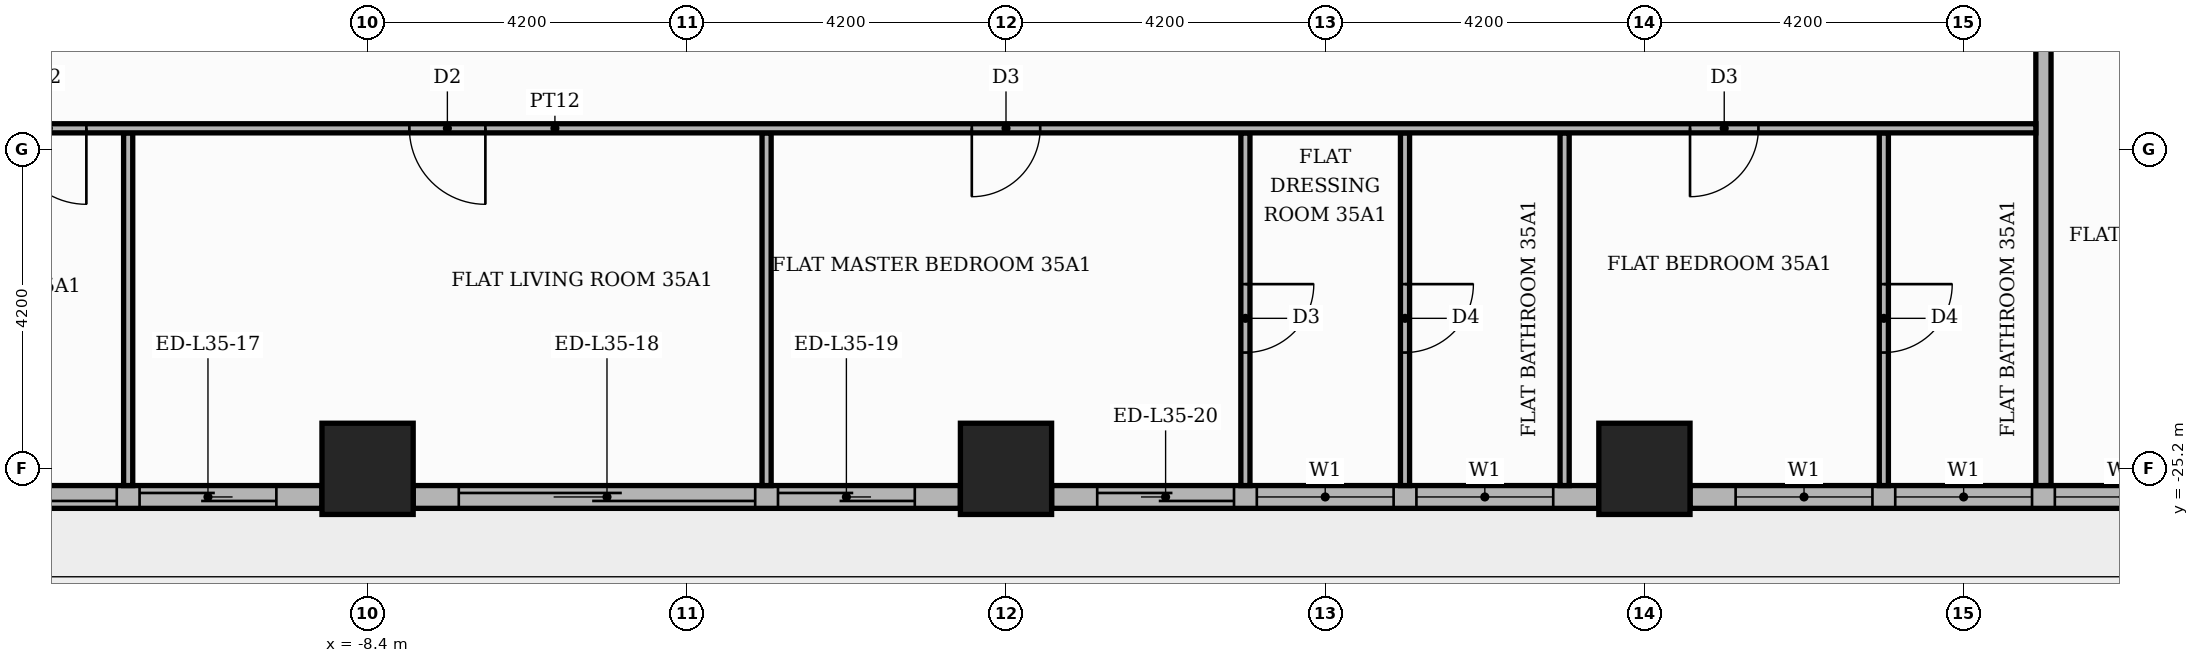
"""IFC4 building model, lengths in metres.
Left out: names, types, materials, properties, quantities, classifications, styles, units other than length and angle.
Written with IfcOpenShell. Run it as: python <this file> out.ifc"""

import sys

from ifc_helpers import new_model, si_unit, direction, frame, frame_2d, origin, origin_2d, place, context, subcontext, project, spatial, rectangle, extrude, element, fill, save


model = new_model("IFC4")
c1 = context("Model", 3, precision=1e-05, world=origin(), true_north=direction((0.0, 1.0)))
c2 = subcontext(c1, "Body", "Model", "MODEL_VIEW")
j1 = project(units=[si_unit("LENGTHUNIT", "METRE"), si_unit("PLANEANGLEUNIT", "RADIAN")], contexts=[c1])
p1 = place(None, origin())
s1 = spatial("IfcSite", under=j1, at=p1, CompositionType="ELEMENT")
p2 = place(p1, origin())
s2 = spatial("IfcBuilding", under=s1, at=p2, CompositionType="ELEMENT")
p3 = place(p2, frame((0.0, 0.0, 149.4)))
s3 = spatial("IfcBuildingStorey", under=s2, at=p3, CompositionType="ELEMENT", Elevation=149.4)
for number, where, z_axis, x_axis in (
    (1, (0.0, -25.2, 0.0), (0.0, 0.0, 1.0), (1.0, 0.0, 0.0)),
    (2, (8.4, -25.2, 0.0), (0.0, 0.0, 1.0), (1.0, 0.0, 0.0)),
    (3, (-8.4, -25.2, 0.0), (0.0, 0.0, 1.0), (1.0, 0.0, 0.0)),
):
    element("IfcColumn", number, at=place(p3, frame(where, z_axis=z_axis, x_axis=x_axis)), inside=s3, PredefinedType="COLUMN", context=c2, shape_type="SweptSolid", body=[
        extrude(rectangle(XDim=1.2, YDim=1.2, at=origin_2d()), origin(), (0.0, 0.0, 1.0), 3.9),
    ])
p4 = place(p3, frame((-16.2, -25.57, 0.0), z_axis=(0.0, 0.0, 1.0), x_axis=(1.0, 0.0, 0.0)))
e4 = element("IfcWall", 4, at=p4, inside=s3, PredefinedType="STANDARD", context=c2, shape_type="SweptSolid", body=[
    extrude(rectangle(XDim=7.2, YDim=0.3, at=frame_2d((3.6, 0.0))), origin(), (0.0, 0.0, 1.0), 3.48),
])
p5 = place(p4, frame((0.6, 0.0, 0.0)))
e5 = element("IfcOpeningElement", 5, at=p5, cuts=e4, PredefinedType="OPENING", context=c2, shape_type="SweptSolid", body=[
    extrude(rectangle(XDim=3.9, YDim=2.4, at=frame_2d((1.95, 1.2))), frame((0.0, 0.16, 0.0), z_axis=(0.0, -1.0, 0.0), x_axis=(1.0, 0.0, 0.0)), (0.0, 0.0, 1.0), 0.32),
])
p6 = place(p4, frame((4.8, 0.0, 0.0)))
e6 = element("IfcOpeningElement", 6, at=p6, cuts=e4, PredefinedType="OPENING", context=c2, shape_type="SweptSolid", body=[
    extrude(rectangle(XDim=1.8, YDim=2.4, at=frame_2d((0.9, 1.2))), frame((0.0, 0.16, 0.0), z_axis=(0.0, -1.0, 0.0), x_axis=(1.0, 0.0, 0.0)), (0.0, 0.0, 1.0), 0.32),
])
p7 = place(p3, frame((-7.8, -25.57, 0.0), z_axis=(0.0, 0.0, 1.0), x_axis=(1.0, 0.0, 0.0)))
e7 = element("IfcWall", 7, at=p7, inside=s3, PredefinedType="STANDARD", context=c2, shape_type="SweptSolid", body=[
    extrude(rectangle(XDim=7.2, YDim=0.3, at=frame_2d((3.6, 0.0))), origin(), (0.0, 0.0, 1.0), 3.48),
])
p8 = place(p7, frame((0.6, 0.0, 0.0)))
e8 = element("IfcOpeningElement", 8, at=p8, cuts=e7, PredefinedType="OPENING", context=c2, shape_type="SweptSolid", body=[
    extrude(rectangle(XDim=3.9, YDim=2.4, at=frame_2d((1.95, 1.2))), frame((0.0, 0.16, 0.0), z_axis=(0.0, -1.0, 0.0), x_axis=(1.0, 0.0, 0.0)), (0.0, 0.0, 1.0), 0.32),
])
p9 = place(p7, frame((4.8, 0.0, 0.0)))
e9 = element("IfcOpeningElement", 9, at=p9, cuts=e7, PredefinedType="OPENING", context=c2, shape_type="SweptSolid", body=[
    extrude(rectangle(XDim=1.8, YDim=2.4, at=frame_2d((0.9, 1.2))), frame((0.0, 0.16, 0.0), z_axis=(0.0, -1.0, 0.0), x_axis=(1.0, 0.0, 0.0)), (0.0, 0.0, 1.0), 0.32),
])
p10 = place(p3, frame((0.6, -25.57, 0.0), z_axis=(0.0, 0.0, 1.0), x_axis=(1.0, 0.0, 0.0)))
e10 = element("IfcWall", 10, at=p10, inside=s3, PredefinedType="STANDARD", context=c2, shape_type="SweptSolid", body=[
    extrude(rectangle(XDim=7.2, YDim=0.3, at=frame_2d((3.6, 0.0))), origin(), (0.0, 0.0, 1.0), 3.48),
])
p11 = place(p10, frame((0.6, 0.0, 0.0)))
e11 = element("IfcOpeningElement", 11, at=p11, cuts=e10, PredefinedType="OPENING", context=c2, shape_type="SweptSolid", body=[
    extrude(rectangle(XDim=1.8, YDim=2.4, at=frame_2d((0.9, 1.2))), frame((0.0, 0.16, 0.0), z_axis=(0.0, -1.0, 0.0), x_axis=(1.0, 0.0, 0.0)), (0.0, 0.0, 1.0), 0.32),
])
p12 = place(p10, frame((2.7, 0.0, 0.9)))
e12 = element("IfcOpeningElement", 12, at=p12, cuts=e10, PredefinedType="OPENING", context=c2, shape_type="SweptSolid", body=[
    extrude(rectangle(XDim=1.8, YDim=2.1, at=frame_2d((0.9, 1.05))), frame((0.0, 0.16, 0.0), z_axis=(0.0, -1.0, 0.0), x_axis=(1.0, 0.0, 0.0)), (0.0, 0.0, 1.0), 0.32),
])
p13 = place(p10, frame((4.8, 0.0, 0.9)))
e13 = element("IfcOpeningElement", 13, at=p13, cuts=e10, PredefinedType="OPENING", context=c2, shape_type="SweptSolid", body=[
    extrude(rectangle(XDim=1.8, YDim=2.1, at=frame_2d((0.9, 1.05))), frame((0.0, 0.16, 0.0), z_axis=(0.0, -1.0, 0.0), x_axis=(1.0, 0.0, 0.0)), (0.0, 0.0, 1.0), 0.32),
])
p14 = place(p3, frame((9.0, -25.57, 0.0), z_axis=(0.0, 0.0, 1.0), x_axis=(1.0, 0.0, 0.0)))
e14 = element("IfcWall", 14, at=p14, inside=s3, PredefinedType="STANDARD", context=c2, shape_type="SweptSolid", body=[
    extrude(rectangle(XDim=7.2, YDim=0.3, at=frame_2d((3.6, 0.0))), origin(), (0.0, 0.0, 1.0), 3.48),
])
p15 = place(p14, frame((0.6, 0.0, 0.9)))
e15 = element("IfcOpeningElement", 15, at=p15, cuts=e14, PredefinedType="OPENING", context=c2, shape_type="SweptSolid", body=[
    extrude(rectangle(XDim=1.8, YDim=2.1, at=frame_2d((0.9, 1.05))), frame((0.0, 0.16, 0.0), z_axis=(0.0, -1.0, 0.0), x_axis=(1.0, 0.0, 0.0)), (0.0, 0.0, 1.0), 0.32),
])
p16 = place(p14, frame((2.7, 0.0, 0.9)))
e16 = element("IfcOpeningElement", 16, at=p16, cuts=e14, PredefinedType="OPENING", context=c2, shape_type="SweptSolid", body=[
    extrude(rectangle(XDim=1.8, YDim=2.1, at=frame_2d((0.9, 1.05))), frame((0.0, 0.16, 0.0), z_axis=(0.0, -1.0, 0.0), x_axis=(1.0, 0.0, 0.0)), (0.0, 0.0, 1.0), 0.32),
])
p17 = place(p14, frame((4.8, 0.0, 0.9)))
e17 = element("IfcOpeningElement", 17, at=p17, cuts=e14, PredefinedType="OPENING", context=c2, shape_type="SweptSolid", body=[
    extrude(rectangle(XDim=1.8, YDim=2.1, at=frame_2d((0.9, 1.05))), frame((0.0, 0.16, 0.0), z_axis=(0.0, -1.0, 0.0), x_axis=(1.0, 0.0, 0.0)), (0.0, 0.0, 1.0), 0.32),
])
for number, where, z_axis, x_axis in (
    (18, (-11.55, -25.42, 0.0), (0.0, 0.0, 1.0), (0.0, 1.0, 0.0)),
    (19, (-3.15, -25.42, 0.0), (0.0, 0.0, 1.0), (0.0, 1.0, 0.0)),
):
    element("IfcWall", number, at=place(p3, frame(where, z_axis=z_axis, x_axis=x_axis)), inside=s3, PredefinedType="PARTITIONING", context=c2, shape_type="SweptSolid", body=[
        extrude(rectangle(XDim=4.64, YDim=0.12, at=frame_2d((2.32, 0.0))), origin(), (0.0, 0.0, 1.0), 3.48),
    ])
p18 = place(p3, frame((3.15, -25.42, 0.0), z_axis=(0.0, 0.0, 1.0), x_axis=(0.0, 1.0, 0.0)))
e20 = element("IfcWall", 20, at=p18, inside=s3, PredefinedType="PARTITIONING", context=c2, shape_type="SweptSolid", body=[
    extrude(rectangle(XDim=4.64, YDim=0.12, at=frame_2d((2.32, 0.0))), origin(), (0.0, 0.0, 1.0), 3.48),
])
p19 = place(p18, frame((1.75, 0.0, 0.0)))
e21 = element("IfcOpeningElement", 21, at=p19, cuts=e20, PredefinedType="OPENING", context=c2, shape_type="SweptSolid", body=[
    extrude(rectangle(XDim=0.9, YDim=2.1, at=frame_2d((0.45, 1.05))), frame((0.0, 0.07, 0.0), z_axis=(0.0, -1.0, 0.0), x_axis=(1.0, 0.0, 0.0)), (0.0, 0.0, 1.0), 0.14),
])
p20 = place(p3, frame((5.25, -25.42, 0.0), z_axis=(0.0, 0.0, 1.0), x_axis=(0.0, 1.0, 0.0)))
e22 = element("IfcWall", 22, at=p20, inside=s3, PredefinedType="PARTITIONING", context=c2, shape_type="SweptSolid", body=[
    extrude(rectangle(XDim=4.64, YDim=0.12, at=frame_2d((2.32, 0.0))), origin(), (0.0, 0.0, 1.0), 3.48),
])
p21 = place(p20, frame((1.75, 0.0, 0.0)))
e23 = element("IfcOpeningElement", 23, at=p21, cuts=e22, PredefinedType="OPENING", context=c2, shape_type="SweptSolid", body=[
    extrude(rectangle(XDim=0.9, YDim=2.1, at=frame_2d((0.45, 1.05))), frame((0.0, 0.07, 0.0), z_axis=(0.0, -1.0, 0.0), x_axis=(1.0, 0.0, 0.0)), (0.0, 0.0, 1.0), 0.14),
])
p22 = place(p3, frame((7.35, -25.42, 0.0), z_axis=(0.0, 0.0, 1.0), x_axis=(0.0, 1.0, 0.0)))
e24 = element("IfcWall", 24, at=p22, inside=s3, PredefinedType="PARTITIONING", context=c2, shape_type="SweptSolid", body=[
    extrude(rectangle(XDim=4.64, YDim=0.12, at=frame_2d((2.32, 0.0))), origin(), (0.0, 0.0, 1.0), 3.48),
])
p23 = place(p3, frame((11.55, -25.42, 0.0), z_axis=(0.0, 0.0, 1.0), x_axis=(0.0, 1.0, 0.0)))
e25 = element("IfcWall", 25, at=p23, inside=s3, PredefinedType="PARTITIONING", context=c2, shape_type="SweptSolid", body=[
    extrude(rectangle(XDim=4.64, YDim=0.12, at=frame_2d((2.32, 0.0))), origin(), (0.0, 0.0, 1.0), 3.48),
])
p24 = place(p23, frame((1.75, 0.0, 0.0)))
e26 = element("IfcOpeningElement", 26, at=p24, cuts=e25, PredefinedType="OPENING", context=c2, shape_type="SweptSolid", body=[
    extrude(rectangle(XDim=0.9, YDim=2.1, at=frame_2d((0.45, 1.05))), frame((0.0, 0.07, 0.0), z_axis=(0.0, -1.0, 0.0), x_axis=(1.0, 0.0, 0.0)), (0.0, 0.0, 1.0), 0.14),
])
p25 = place(p3, frame((13.65, -25.42, 0.0), z_axis=(0.0, 0.0, 1.0), x_axis=(0.0, 1.0, 0.0)))
e27 = element("IfcWall", 27, at=p25, inside=s3, PredefinedType="PARTITIONING", context=c2, shape_type="SweptSolid", body=[
    extrude(rectangle(XDim=11.67, YDim=0.2, at=frame_2d((5.835, 0.0))), origin(), (0.0, 0.0, 1.0), 3.48),
])
p26 = place(p3, frame((-25.42, -20.72, 0.0), z_axis=(0.0, 0.0, 1.0), x_axis=(1.0, 0.0, 0.0)))
e28 = element("IfcWall", 28, at=p26, inside=s3, PredefinedType="PARTITIONING", context=c2, shape_type="SweptSolid", body=[
    extrude(rectangle(XDim=38.97, YDim=0.12, at=frame_2d((19.485, 0.0))), origin(), (0.0, 0.0, 1.0), 3.48),
])
p27 = place(p26, frame((12.32, 0.0, 0.0)))
e29 = element("IfcOpeningElement", 29, at=p27, cuts=e28, PredefinedType="OPENING", context=c2, shape_type="SweptSolid", body=[
    extrude(rectangle(XDim=1.0, YDim=2.1, at=frame_2d((0.5, 1.05))), frame((0.0, 0.07, 0.0), z_axis=(0.0, -1.0, 0.0), x_axis=(1.0, 0.0, 0.0)), (0.0, 0.0, 1.0), 0.14),
])
p28 = place(p26, frame((17.57, 0.0, 0.0)))
e30 = element("IfcOpeningElement", 30, at=p28, cuts=e28, PredefinedType="OPENING", context=c2, shape_type="SweptSolid", body=[
    extrude(rectangle(XDim=1.0, YDim=2.1, at=frame_2d((0.5, 1.05))), frame((0.0, 0.07, 0.0), z_axis=(0.0, -1.0, 0.0), x_axis=(1.0, 0.0, 0.0)), (0.0, 0.0, 1.0), 0.14),
])
p29 = place(p26, frame((24.97, 0.0, 0.0)))
e31 = element("IfcOpeningElement", 31, at=p29, cuts=e28, PredefinedType="OPENING", context=c2, shape_type="SweptSolid", body=[
    extrude(rectangle(XDim=0.9, YDim=2.1, at=frame_2d((0.45, 1.05))), frame((0.0, 0.07, 0.0), z_axis=(0.0, -1.0, 0.0), x_axis=(1.0, 0.0, 0.0)), (0.0, 0.0, 1.0), 0.14),
])
p30 = place(p26, frame((34.42, 0.0, 0.0)))
e32 = element("IfcOpeningElement", 32, at=p30, cuts=e28, PredefinedType="OPENING", context=c2, shape_type="SweptSolid", body=[
    extrude(rectangle(XDim=0.9, YDim=2.1, at=frame_2d((0.45, 1.05))), frame((0.0, 0.07, 0.0), z_axis=(0.0, -1.0, 0.0), x_axis=(1.0, 0.0, 0.0)), (0.0, 0.0, 1.0), 0.14),
])
p31 = place(p5, origin())
e33 = element("IfcDoor", 33, at=p31, inside=s3, OperationType="SLIDING_TO_LEFT", PredefinedType="DOOR", context=c2, shape_type="SweptSolid", body=[
    extrude(rectangle(XDim=3.9, YDim=2.4, at=frame_2d((1.95, 1.2))), frame((0.0, 0.025, 0.0), z_axis=(0.0, -1.0, 0.0), x_axis=(1.0, 0.0, 0.0)), (0.0, 0.0, 1.0), 0.05),
])
fill(e5, e33)
p32 = place(p6, origin())
e34 = element("IfcDoor", 34, at=p32, inside=s3, OperationType="SLIDING_TO_RIGHT", PredefinedType="DOOR", context=c2, shape_type="SweptSolid", body=[
    extrude(rectangle(XDim=1.8, YDim=2.4, at=frame_2d((0.9, 1.2))), frame((0.0, 0.025, 0.0), z_axis=(0.0, -1.0, 0.0), x_axis=(1.0, 0.0, 0.0)), (0.0, 0.0, 1.0), 0.05),
])
fill(e6, e34)
p33 = place(p8, origin())
e35 = element("IfcDoor", 35, at=p33, inside=s3, OperationType="SLIDING_TO_LEFT", PredefinedType="DOOR", context=c2, shape_type="SweptSolid", body=[
    extrude(rectangle(XDim=3.9, YDim=2.4, at=frame_2d((1.95, 1.2))), frame((0.0, 0.025, 0.0), z_axis=(0.0, -1.0, 0.0), x_axis=(1.0, 0.0, 0.0)), (0.0, 0.0, 1.0), 0.05),
])
fill(e8, e35)
p34 = place(p9, origin())
e36 = element("IfcDoor", 36, at=p34, inside=s3, OperationType="SLIDING_TO_RIGHT", PredefinedType="DOOR", context=c2, shape_type="SweptSolid", body=[
    extrude(rectangle(XDim=1.8, YDim=2.4, at=frame_2d((0.9, 1.2))), frame((0.0, 0.025, 0.0), z_axis=(0.0, -1.0, 0.0), x_axis=(1.0, 0.0, 0.0)), (0.0, 0.0, 1.0), 0.05),
])
fill(e9, e36)
p35 = place(p11, origin())
e37 = element("IfcDoor", 37, at=p35, inside=s3, OperationType="SLIDING_TO_LEFT", PredefinedType="DOOR", context=c2, shape_type="SweptSolid", body=[
    extrude(rectangle(XDim=1.8, YDim=2.4, at=frame_2d((0.9, 1.2))), frame((0.0, 0.025, 0.0), z_axis=(0.0, -1.0, 0.0), x_axis=(1.0, 0.0, 0.0)), (0.0, 0.0, 1.0), 0.05),
])
fill(e11, e37)
p36 = place(p12, origin())
e38 = element("IfcWindow", 38, at=p36, inside=s3, PartitioningType="SINGLE_PANEL", PredefinedType="WINDOW", context=c2, shape_type="SweptSolid", body=[
    extrude(rectangle(XDim=1.8, YDim=2.1, at=frame_2d((0.9, 1.05))), frame((0.0, 0.03, 0.0), z_axis=(0.0, -1.0, 0.0), x_axis=(1.0, 0.0, 0.0)), (0.0, 0.0, 1.0), 0.06),
])
fill(e12, e38)
p37 = place(p13, origin())
e39 = element("IfcWindow", 39, at=p37, inside=s3, PartitioningType="SINGLE_PANEL", PredefinedType="WINDOW", context=c2, shape_type="SweptSolid", body=[
    extrude(rectangle(XDim=1.8, YDim=2.1, at=frame_2d((0.9, 1.05))), frame((0.0, 0.03, 0.0), z_axis=(0.0, -1.0, 0.0), x_axis=(1.0, 0.0, 0.0)), (0.0, 0.0, 1.0), 0.06),
])
fill(e13, e39)
p38 = place(p15, origin())
e40 = element("IfcWindow", 40, at=p38, inside=s3, PartitioningType="SINGLE_PANEL", PredefinedType="WINDOW", context=c2, shape_type="SweptSolid", body=[
    extrude(rectangle(XDim=1.8, YDim=2.1, at=frame_2d((0.9, 1.05))), frame((0.0, 0.03, 0.0), z_axis=(0.0, -1.0, 0.0), x_axis=(1.0, 0.0, 0.0)), (0.0, 0.0, 1.0), 0.06),
])
fill(e15, e40)
p39 = place(p16, origin())
e41 = element("IfcWindow", 41, at=p39, inside=s3, PartitioningType="SINGLE_PANEL", PredefinedType="WINDOW", context=c2, shape_type="SweptSolid", body=[
    extrude(rectangle(XDim=1.8, YDim=2.1, at=frame_2d((0.9, 1.05))), frame((0.0, 0.03, 0.0), z_axis=(0.0, -1.0, 0.0), x_axis=(1.0, 0.0, 0.0)), (0.0, 0.0, 1.0), 0.06),
])
fill(e16, e41)
p40 = place(p17, origin())
e42 = element("IfcWindow", 42, at=p40, inside=s3, PartitioningType="SINGLE_PANEL", PredefinedType="WINDOW", context=c2, shape_type="SweptSolid", body=[
    extrude(rectangle(XDim=1.8, YDim=2.1, at=frame_2d((0.9, 1.05))), frame((0.0, 0.03, 0.0), z_axis=(0.0, -1.0, 0.0), x_axis=(1.0, 0.0, 0.0)), (0.0, 0.0, 1.0), 0.06),
])
fill(e17, e42)
p41 = place(p27, frame((1.0, 0.0, 0.0), z_axis=(0.0, 0.0, 1.0), x_axis=(-1.0, 0.0, 0.0)))
e43 = element("IfcDoor", 43, at=p41, inside=s3, OperationType="SINGLE_SWING_RIGHT", PredefinedType="DOOR", context=c2, shape_type="SweptSolid", body=[
    extrude(rectangle(XDim=1.0, YDim=2.1, at=frame_2d((0.5, 1.05))), frame((0.0, 0.025, 0.0), z_axis=(0.0, -1.0, 0.0), x_axis=(1.0, 0.0, 0.0)), (0.0, 0.0, 1.0), 0.05),
])
fill(e29, e43)
p42 = place(p28, frame((1.0, 0.0, 0.0), z_axis=(0.0, 0.0, 1.0), x_axis=(-1.0, 0.0, 0.0)))
e44 = element("IfcDoor", 44, at=p42, inside=s3, OperationType="SINGLE_SWING_RIGHT", PredefinedType="DOOR", context=c2, shape_type="SweptSolid", body=[
    extrude(rectangle(XDim=1.0, YDim=2.1, at=frame_2d((0.5, 1.05))), frame((0.0, 0.025, 0.0), z_axis=(0.0, -1.0, 0.0), x_axis=(1.0, 0.0, 0.0)), (0.0, 0.0, 1.0), 0.05),
])
fill(e30, e44)
p43 = place(p29, frame((0.9, 0.0, 0.0), z_axis=(0.0, 0.0, 1.0), x_axis=(-1.0, 0.0, 0.0)))
e45 = element("IfcDoor", 45, at=p43, inside=s3, OperationType="SINGLE_SWING_LEFT", PredefinedType="DOOR", context=c2, shape_type="SweptSolid", body=[
    extrude(rectangle(XDim=0.9, YDim=2.1, at=frame_2d((0.45, 1.05))), frame((0.0, 0.025, 0.0), z_axis=(0.0, -1.0, 0.0), x_axis=(1.0, 0.0, 0.0)), (0.0, 0.0, 1.0), 0.05),
])
fill(e31, e45)
p44 = place(p19, frame((0.9, 0.0, 0.0), z_axis=(0.0, 0.0, 1.0), x_axis=(-1.0, 0.0, 0.0)))
e46 = element("IfcDoor", 46, at=p44, inside=s3, OperationType="SINGLE_SWING_RIGHT", PredefinedType="DOOR", context=c2, shape_type="SweptSolid", body=[
    extrude(rectangle(XDim=0.9, YDim=2.1, at=frame_2d((0.45, 1.05))), frame((0.0, 0.025, 0.0), z_axis=(0.0, -1.0, 0.0), x_axis=(1.0, 0.0, 0.0)), (0.0, 0.0, 1.0), 0.05),
])
fill(e21, e46)
p45 = place(p21, frame((0.9, 0.0, 0.0), z_axis=(0.0, 0.0, 1.0), x_axis=(-1.0, 0.0, 0.0)))
e47 = element("IfcDoor", 47, at=p45, inside=s3, OperationType="SINGLE_SWING_RIGHT", PredefinedType="DOOR", context=c2, shape_type="SweptSolid", body=[
    extrude(rectangle(XDim=0.9, YDim=2.1, at=frame_2d((0.45, 1.05))), frame((0.0, 0.025, 0.0), z_axis=(0.0, -1.0, 0.0), x_axis=(1.0, 0.0, 0.0)), (0.0, 0.0, 1.0), 0.05),
])
fill(e23, e47)
p46 = place(p30, frame((0.9, 0.0, 0.0), z_axis=(0.0, 0.0, 1.0), x_axis=(-1.0, 0.0, 0.0)))
e48 = element("IfcDoor", 48, at=p46, inside=s3, OperationType="SINGLE_SWING_LEFT", PredefinedType="DOOR", context=c2, shape_type="SweptSolid", body=[
    extrude(rectangle(XDim=0.9, YDim=2.1, at=frame_2d((0.45, 1.05))), frame((0.0, 0.025, 0.0), z_axis=(0.0, -1.0, 0.0), x_axis=(1.0, 0.0, 0.0)), (0.0, 0.0, 1.0), 0.05),
])
fill(e32, e48)
p47 = place(p24, frame((0.9, 0.0, 0.0), z_axis=(0.0, 0.0, 1.0), x_axis=(-1.0, 0.0, 0.0)))
e49 = element("IfcDoor", 49, at=p47, inside=s3, OperationType="SINGLE_SWING_RIGHT", PredefinedType="DOOR", context=c2, shape_type="SweptSolid", body=[
    extrude(rectangle(XDim=0.9, YDim=2.1, at=frame_2d((0.45, 1.05))), frame((0.0, 0.025, 0.0), z_axis=(0.0, -1.0, 0.0), x_axis=(1.0, 0.0, 0.0)), (0.0, 0.0, 1.0), 0.05),
])
fill(e26, e49)
save(model, sys.argv[1])
